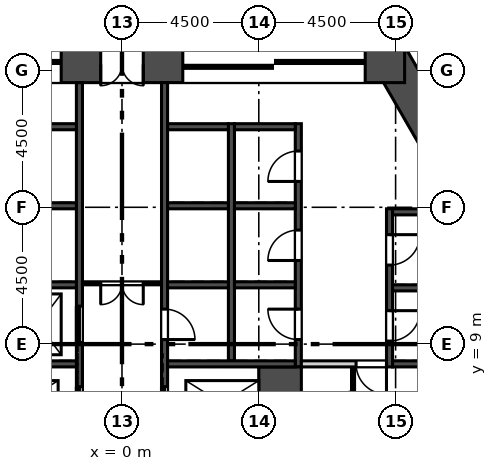
"""IFC4 building model, lengths in metres.
Left out: names, types, materials, properties, quantities, classifications, styles, units other than length and angle.
Written with IfcOpenShell. Run it as: python <this file> out.ifc"""

import sys

from ifc_helpers import new_model, si_unit, direction, frame, frame_2d, origin, place, context, subcontext, project, spatial, rectangle, extrude, element, fill, save


model = new_model("IFC4")
c1 = context("Model", 3, precision=1e-05, world=origin(), true_north=direction((0.0, 1.0)))
c2 = subcontext(c1, "Body", "Model", "MODEL_VIEW")
j1 = project(units=[si_unit("LENGTHUNIT", "METRE"), si_unit("PLANEANGLEUNIT", "RADIAN")], contexts=[c1])
p1 = place(None, origin())
s1 = spatial("IfcSite", under=j1, at=p1, CompositionType="ELEMENT")
p2 = place(p1, origin())
s2 = spatial("IfcBuilding", under=s1, at=p2, CompositionType="ELEMENT")
p3 = place(p2, frame((0.0, 0.0, 132.1)))
s3 = spatial("IfcBuildingStorey", under=s2, at=p3, CompositionType="ELEMENT", Elevation=132.1)
p4 = place(p3, frame((13.281, 10.699, 0.0), z_axis=(0.0, 0.0, 1.0), x_axis=(-0.499998513025, 0.866026262288, 0.0)))
e1 = element("IfcWall", 1, at=p4, inside=s3, PredefinedType="SHEAR", context=c2, shape_type="SweptSolid", body=[
    extrude(rectangle(XDim=9.008, YDim=1.2, at=frame_2d((4.504, 0.0))), origin(), (0.0, 0.0, 1.0), 5.4),
])
p5 = place(p3, frame((9.296, 18.2, 0.0), z_axis=(0.0, 0.0, 1.0), x_axis=(-1.0, 0.0, 0.0)))
e2 = element("IfcWall", 2, at=p5, inside=s3, PredefinedType="SHEAR", context=c2, shape_type="SweptSolid", body=[
    extrude(rectangle(XDim=18.592, YDim=1.2, at=frame_2d((9.296, 0.0))), origin(), (0.0, 0.0, 1.0), 5.4),
])
p6 = place(p5, frame((8.596, 0.0, 0.0)))
e3 = element("IfcOpeningElement", 3, at=p6, cuts=e2, PredefinedType="OPENING", context=c2, shape_type="SweptSolid", body=[
    extrude(rectangle(XDim=1.4, YDim=2.1, at=frame_2d((0.7, 1.05))), frame((0.0, 0.61, 0.0), z_axis=(0.0, -1.0, 0.0), x_axis=(1.0, 0.0, 0.0)), (0.0, 0.0, 1.0), 1.22),
])
p7 = place(p5, frame((11.296, 0.0, 0.0)))
e4 = element("IfcOpeningElement", 4, at=p7, cuts=e2, PredefinedType="OPENING", context=c2, shape_type="SweptSolid", body=[
    extrude(rectangle(XDim=6.0, YDim=2.4, at=frame_2d((3.0, 1.2))), frame((0.0, 0.61, 0.0), z_axis=(0.0, -1.0, 0.0), x_axis=(1.0, 0.0, 0.0)), (0.0, 0.0, 1.0), 1.22),
])
p8 = place(p5, frame((1.296, 0.0, 0.0)))
e5 = element("IfcOpeningElement", 5, at=p8, cuts=e2, PredefinedType="OPENING", context=c2, shape_type="SweptSolid", body=[
    extrude(rectangle(XDim=6.0, YDim=2.4, at=frame_2d((3.0, 1.2))), frame((0.0, 0.61, 0.0), z_axis=(0.0, -1.0, 0.0), x_axis=(1.0, 0.0, 0.0)), (0.0, 0.0, 1.0), 1.22),
])
p9 = place(p3, frame((29.746, 7.709, 0.0), z_axis=(0.0, 0.0, 1.0), x_axis=(-0.500000700546, 0.866024999324, 0.0)))
e6 = element("IfcWall", 6, at=p9, inside=s3, PredefinedType="SOLIDWALL", context=c2, shape_type="SweptSolid", body=[
    extrude(rectangle(XDim=50.787, YDim=0.34, at=frame_2d((25.393, 0.0))), origin(), (0.0, 0.0, 1.0), 5.0),
])
p10 = place(p9, frame((3.197, 0.0, 0.9)))
e7 = element("IfcOpeningElement", 7, at=p10, cuts=e6, PredefinedType="OPENING", context=c2, shape_type="SweptSolid", body=[
    extrude(rectangle(XDim=1.885, YDim=3.0, at=frame_2d((0.942, 1.5))), frame((0.0, 0.18, 0.0), z_axis=(0.0, -1.0, 0.0), x_axis=(1.0, 0.0, 0.0)), (0.0, 0.0, 1.0), 0.36),
])
p11 = place(p9, frame((6.197, 0.0, 0.9)))
e8 = element("IfcOpeningElement", 8, at=p11, cuts=e6, PredefinedType="OPENING", context=c2, shape_type="SweptSolid", body=[
    extrude(rectangle(XDim=1.885, YDim=3.0, at=frame_2d((0.942, 1.5))), frame((0.0, 0.18, 0.0), z_axis=(0.0, -1.0, 0.0), x_axis=(1.0, 0.0, 0.0)), (0.0, 0.0, 1.0), 0.36),
])
p12 = place(p9, frame((9.197, 0.0, 0.9)))
e9 = element("IfcOpeningElement", 9, at=p12, cuts=e6, PredefinedType="OPENING", context=c2, shape_type="SweptSolid", body=[
    extrude(rectangle(XDim=1.885, YDim=3.0, at=frame_2d((0.942, 1.5))), frame((0.0, 0.18, 0.0), z_axis=(0.0, -1.0, 0.0), x_axis=(1.0, 0.0, 0.0)), (0.0, 0.0, 1.0), 0.36),
])
p13 = place(p9, frame((12.197, 0.0, 0.9)))
e10 = element("IfcOpeningElement", 10, at=p13, cuts=e6, PredefinedType="OPENING", context=c2, shape_type="SweptSolid", body=[
    extrude(rectangle(XDim=1.885, YDim=3.0, at=frame_2d((0.942, 1.5))), frame((0.0, 0.18, 0.0), z_axis=(0.0, -1.0, 0.0), x_axis=(1.0, 0.0, 0.0)), (0.0, 0.0, 1.0), 0.36),
])
p14 = place(p9, frame((15.197, 0.0, 0.9)))
e11 = element("IfcOpeningElement", 11, at=p14, cuts=e6, PredefinedType="OPENING", context=c2, shape_type="SweptSolid", body=[
    extrude(rectangle(XDim=1.885, YDim=3.0, at=frame_2d((0.942, 1.5))), frame((0.0, 0.18, 0.0), z_axis=(0.0, -1.0, 0.0), x_axis=(1.0, 0.0, 0.0)), (0.0, 0.0, 1.0), 0.36),
])
p15 = place(p9, frame((18.197, 0.0, 0.9)))
e12 = element("IfcOpeningElement", 12, at=p15, cuts=e6, PredefinedType="OPENING", context=c2, shape_type="SweptSolid", body=[
    extrude(rectangle(XDim=1.885, YDim=3.0, at=frame_2d((0.942, 1.5))), frame((0.0, 0.18, 0.0), z_axis=(0.0, -1.0, 0.0), x_axis=(1.0, 0.0, 0.0)), (0.0, 0.0, 1.0), 0.36),
])
p16 = place(p9, frame((21.197, 0.0, 0.9)))
e13 = element("IfcOpeningElement", 13, at=p16, cuts=e6, PredefinedType="OPENING", context=c2, shape_type="SweptSolid", body=[
    extrude(rectangle(XDim=1.885, YDim=3.0, at=frame_2d((0.942, 1.5))), frame((0.0, 0.18, 0.0), z_axis=(0.0, -1.0, 0.0), x_axis=(1.0, 0.0, 0.0)), (0.0, 0.0, 1.0), 0.36),
])
p17 = place(p9, frame((24.197, 0.0, 0.9)))
e14 = element("IfcOpeningElement", 14, at=p17, cuts=e6, PredefinedType="OPENING", context=c2, shape_type="SweptSolid", body=[
    extrude(rectangle(XDim=1.885, YDim=3.0, at=frame_2d((0.942, 1.5))), frame((0.0, 0.18, 0.0), z_axis=(0.0, -1.0, 0.0), x_axis=(1.0, 0.0, 0.0)), (0.0, 0.0, 1.0), 0.36),
])
p18 = place(p9, frame((27.197, 0.0, 0.9)))
e15 = element("IfcOpeningElement", 15, at=p18, cuts=e6, PredefinedType="OPENING", context=c2, shape_type="SweptSolid", body=[
    extrude(rectangle(XDim=1.885, YDim=3.0, at=frame_2d((0.942, 1.5))), frame((0.0, 0.18, 0.0), z_axis=(0.0, -1.0, 0.0), x_axis=(1.0, 0.0, 0.0)), (0.0, 0.0, 1.0), 0.36),
])
p19 = place(p9, frame((30.197, 0.0, 0.9)))
e16 = element("IfcOpeningElement", 16, at=p19, cuts=e6, PredefinedType="OPENING", context=c2, shape_type="SweptSolid", body=[
    extrude(rectangle(XDim=1.885, YDim=3.0, at=frame_2d((0.942, 1.5))), frame((0.0, 0.18, 0.0), z_axis=(0.0, -1.0, 0.0), x_axis=(1.0, 0.0, 0.0)), (0.0, 0.0, 1.0), 0.36),
])
p20 = place(p9, frame((33.197, 0.0, 0.9)))
e17 = element("IfcOpeningElement", 17, at=p20, cuts=e6, PredefinedType="OPENING", context=c2, shape_type="SweptSolid", body=[
    extrude(rectangle(XDim=1.885, YDim=3.0, at=frame_2d((0.942, 1.5))), frame((0.0, 0.18, 0.0), z_axis=(0.0, -1.0, 0.0), x_axis=(1.0, 0.0, 0.0)), (0.0, 0.0, 1.0), 0.36),
])
p21 = place(p9, frame((36.197, 0.0, 0.9)))
e18 = element("IfcOpeningElement", 18, at=p21, cuts=e6, PredefinedType="OPENING", context=c2, shape_type="SweptSolid", body=[
    extrude(rectangle(XDim=1.885, YDim=3.0, at=frame_2d((0.942, 1.5))), frame((0.0, 0.18, 0.0), z_axis=(0.0, -1.0, 0.0), x_axis=(1.0, 0.0, 0.0)), (0.0, 0.0, 1.0), 0.36),
])
p22 = place(p9, frame((39.197, 0.0, 0.9)))
e19 = element("IfcOpeningElement", 19, at=p22, cuts=e6, PredefinedType="OPENING", context=c2, shape_type="SweptSolid", body=[
    extrude(rectangle(XDim=1.885, YDim=3.0, at=frame_2d((0.942, 1.5))), frame((0.0, 0.18, 0.0), z_axis=(0.0, -1.0, 0.0), x_axis=(1.0, 0.0, 0.0)), (0.0, 0.0, 1.0), 0.36),
])
p23 = place(p9, frame((42.197, 0.0, 0.9)))
e20 = element("IfcOpeningElement", 20, at=p23, cuts=e6, PredefinedType="OPENING", context=c2, shape_type="SweptSolid", body=[
    extrude(rectangle(XDim=1.885, YDim=3.0, at=frame_2d((0.942, 1.5))), frame((0.0, 0.18, 0.0), z_axis=(0.0, -1.0, 0.0), x_axis=(1.0, 0.0, 0.0)), (0.0, 0.0, 1.0), 0.36),
])
p24 = place(p9, frame((45.197, 0.0, 0.9)))
e21 = element("IfcOpeningElement", 21, at=p24, cuts=e6, PredefinedType="OPENING", context=c2, shape_type="SweptSolid", body=[
    extrude(rectangle(XDim=1.885, YDim=3.0, at=frame_2d((0.942, 1.5))), frame((0.0, 0.18, 0.0), z_axis=(0.0, -1.0, 0.0), x_axis=(1.0, 0.0, 0.0)), (0.0, 0.0, 1.0), 0.36),
])
p25 = place(p3, frame((8.8, 8.25, -0.4), z_axis=(0.0, 0.0, 1.0), x_axis=(0.0, 1.0, 0.0)))
e22 = element("IfcWall", 22, at=p25, inside=s3, PredefinedType="SOLIDWALL", context=c2, shape_type="SweptSolid", body=[
    extrude(rectangle(XDim=5.2, YDim=0.2, at=frame_2d((2.6, 0.0))), origin(), (0.0, 0.0, 1.0), 5.4),
])
p26 = place(p25, frame((0.85, 0.0, 0.4)))
e23 = element("IfcOpeningElement", 23, at=p26, cuts=e22, PredefinedType="OPENING", context=c2, shape_type="SweptSolid", body=[
    extrude(rectangle(XDim=1.0, YDim=2.1, at=frame_2d((0.5, 1.05))), frame((0.0, 0.11, 0.0), z_axis=(0.0, -1.0, 0.0), x_axis=(1.0, 0.0, 0.0)), (0.0, 0.0, 1.0), 0.22),
])
p27 = place(p25, frame((3.35, 0.0, 0.4)))
e24 = element("IfcOpeningElement", 24, at=p27, cuts=e22, PredefinedType="OPENING", context=c2, shape_type="SweptSolid", body=[
    extrude(rectangle(XDim=1.0, YDim=2.1, at=frame_2d((0.5, 1.05))), frame((0.0, 0.11, 0.0), z_axis=(0.0, -1.0, 0.0), x_axis=(1.0, 0.0, 0.0)), (0.0, 0.0, 1.0), 0.22),
])
p28 = place(p3, frame((5.8, 8.25, -0.4), z_axis=(0.0, 0.0, 1.0), x_axis=(0.0, 1.0, 0.0)))
e25 = element("IfcWall", 25, at=p28, inside=s3, PredefinedType="SOLIDWALL", context=c2, shape_type="SweptSolid", body=[
    extrude(rectangle(XDim=8.0, YDim=0.2, at=frame_2d((4.0, 0.0))), origin(), (0.0, 0.0, 1.0), 5.4),
])
p29 = place(p28, frame((0.9, 0.0, 0.4)))
e26 = element("IfcOpeningElement", 26, at=p29, cuts=e25, PredefinedType="OPENING", context=c2, shape_type="SweptSolid", body=[
    extrude(rectangle(XDim=1.0, YDim=2.1, at=frame_2d((0.5, 1.05))), frame((0.0, 0.11, 0.0), z_axis=(0.0, -1.0, 0.0), x_axis=(1.0, 0.0, 0.0)), (0.0, 0.0, 1.0), 0.22),
])
p30 = place(p28, frame((3.5, 0.0, 0.4)))
e27 = element("IfcOpeningElement", 27, at=p30, cuts=e25, PredefinedType="OPENING", context=c2, shape_type="SweptSolid", body=[
    extrude(rectangle(XDim=1.0, YDim=2.1, at=frame_2d((0.5, 1.05))), frame((0.0, 0.11, 0.0), z_axis=(0.0, -1.0, 0.0), x_axis=(1.0, 0.0, 0.0)), (0.0, 0.0, 1.0), 0.22),
])
p31 = place(p28, frame((6.1, 0.0, 0.4)))
e28 = element("IfcOpeningElement", 28, at=p31, cuts=e25, PredefinedType="OPENING", context=c2, shape_type="SweptSolid", body=[
    extrude(rectangle(XDim=1.0, YDim=2.1, at=frame_2d((0.5, 1.05))), frame((0.0, 0.11, 0.0), z_axis=(0.0, -1.0, 0.0), x_axis=(1.0, 0.0, 0.0)), (0.0, 0.0, 1.0), 0.22),
])
p32 = place(p3, frame((3.6, 8.45, -0.4), z_axis=(0.0, 0.0, 1.0), x_axis=(0.0, 1.0, 0.0)))
e29 = element("IfcWall", 29, at=p32, inside=s3, PredefinedType="SOLIDWALL", context=c2, shape_type="SweptSolid", body=[
    extrude(rectangle(XDim=7.8, YDim=0.2, at=frame_2d((3.9, 0.0))), origin(), (0.0, 0.0, 1.0), 5.4),
])
p33 = place(p3, frame((-1.4, 5.85, -0.4), z_axis=(0.0, 0.0, 1.0), x_axis=(0.0, 1.0, 0.0)))
e30 = element("IfcWall", 30, at=p33, inside=s3, PredefinedType="SOLIDWALL", context=c2, shape_type="SweptSolid", body=[
    extrude(rectangle(XDim=11.75, YDim=0.2, at=frame_2d((5.875, 0.0))), origin(), (0.0, 0.0, 1.0), 5.4),
])
p34 = place(p33, frame((3.2, 0.0, 0.4)))
e31 = element("IfcOpeningElement", 31, at=p34, cuts=e30, PredefinedType="OPENING", context=c2, shape_type="SweptSolid", body=[
    extrude(rectangle(XDim=1.2, YDim=2.1, at=frame_2d((0.6, 1.05))), frame((0.0, 0.11, 0.0), z_axis=(0.0, -1.0, 0.0), x_axis=(1.0, 0.0, 0.0)), (0.0, 0.0, 1.0), 0.22),
])
p35 = place(p33, frame((0.65, 0.0, 0.4)))
e32 = element("IfcOpeningElement", 32, at=p35, cuts=e30, PredefinedType="OPENING", context=c2, shape_type="SweptSolid", body=[
    extrude(rectangle(XDim=1.1, YDim=2.1, at=frame_2d((0.55, 1.05))), frame((0.0, 0.11, 0.0), z_axis=(0.0, -1.0, 0.0), x_axis=(1.0, 0.0, 0.0)), (0.0, 0.0, 1.0), 0.22),
])
p36 = place(p3, frame((1.4, 5.85, -0.4), z_axis=(0.0, 0.0, 1.0), x_axis=(0.0, 1.0, 0.0)))
e33 = element("IfcWall", 33, at=p36, inside=s3, PredefinedType="SOLIDWALL", context=c2, shape_type="SweptSolid", body=[
    extrude(rectangle(XDim=11.75, YDim=0.2, at=frame_2d((5.875, 0.0))), origin(), (0.0, 0.0, 1.0), 5.4),
])
p37 = place(p36, frame((0.65, 0.0, 0.4)))
e34 = element("IfcOpeningElement", 34, at=p37, cuts=e33, PredefinedType="OPENING", context=c2, shape_type="SweptSolid", body=[
    extrude(rectangle(XDim=1.1, YDim=2.1, at=frame_2d((0.55, 1.05))), frame((0.0, 0.11, 0.0), z_axis=(0.0, -1.0, 0.0), x_axis=(1.0, 0.0, 0.0)), (0.0, 0.0, 1.0), 0.22),
])
p38 = place(p36, frame((3.3, 0.0, 0.4)))
e35 = element("IfcOpeningElement", 35, at=p38, cuts=e33, PredefinedType="OPENING", context=c2, shape_type="SweptSolid", body=[
    extrude(rectangle(XDim=1.0, YDim=2.1, at=frame_2d((0.5, 1.05))), frame((0.0, 0.11, 0.0), z_axis=(0.0, -1.0, 0.0), x_axis=(1.0, 0.0, 0.0)), (0.0, 0.0, 1.0), 0.22),
])
p39 = place(p3, frame((5.2, 5.85, -0.4), z_axis=(0.0, 0.0, 1.0), x_axis=(0.0, 1.0, 0.0)))
e36 = element("IfcWall", 36, at=p39, inside=s3, PredefinedType="SOLIDWALL", context=c2, shape_type="SweptSolid", body=[
    extrude(rectangle(XDim=2.4, YDim=1.4, at=frame_2d((1.2, 0.0))), origin(), (0.0, 0.0, 1.0), 5.4),
])
p40 = place(p3, frame((8.9, 8.35, -0.4), z_axis=(0.0, 0.0, 1.0), x_axis=(1.0, 0.0, 0.0)))
e37 = element("IfcWall", 37, at=p40, inside=s3, PredefinedType="SOLIDWALL", context=c2, shape_type="SweptSolid", body=[
    extrude(rectangle(XDim=2.0, YDim=0.2, at=frame_2d((1.0, 0.0))), origin(), (0.0, 0.0, 1.0), 5.4),
])
for number, where, z_axis, x_axis in (
    (38, (-5.7, 8.35, -0.4), (0.0, 0.0, 1.0), (1.0, 0.0, 0.0)),
    (39, (1.5, 8.35, -0.4), (0.0, 0.0, 1.0), (1.0, 0.0, 0.0)),
):
    element("IfcWall", number, at=place(p3, frame(where, z_axis=z_axis, x_axis=x_axis)), inside=s3, PredefinedType="SOLIDWALL", context=c2, shape_type="SweptSolid", body=[
        extrude(rectangle(XDim=4.2, YDim=0.2, at=frame_2d((2.1, 0.0))), origin(), (0.0, 0.0, 1.0), 5.4),
    ])
for number, where, z_axis, x_axis in (
    (40, (-3.5, 10.95, -0.4), (0.0, 0.0, 1.0), (1.0, 0.0, 0.0)),
    (41, (-3.5, 13.55, -0.4), (0.0, 0.0, 1.0), (1.0, 0.0, 0.0)),
    (42, (-3.5, 16.15, -0.4), (0.0, 0.0, 1.0), (1.0, 0.0, 0.0)),
    (43, (8.9, 10.85, -0.4), (0.0, 0.0, 1.0), (1.0, 0.0, 0.0)),
    (44, (8.9, 13.35, -0.4), (0.0, 0.0, 1.0), (1.0, 0.0, 0.0)),
    (45, (3.7, 10.95, -0.4), (0.0, 0.0, 1.0), (1.0, 0.0, 0.0)),
    (46, (3.7, 13.55, -0.4), (0.0, 0.0, 1.0), (1.0, 0.0, 0.0)),
    (47, (3.7, 16.15, -0.4), (0.0, 0.0, 1.0), (1.0, 0.0, 0.0)),
    (48, (1.5, 10.95, -0.4), (0.0, 0.0, 1.0), (1.0, 0.0, 0.0)),
    (49, (1.5, 13.55, -0.4), (0.0, 0.0, 1.0), (1.0, 0.0, 0.0)),
    (50, (1.5, 16.15, -0.4), (0.0, 0.0, 1.0), (1.0, 0.0, 0.0)),
):
    element("IfcWall", number, at=place(p3, frame(where, z_axis=z_axis, x_axis=x_axis)), inside=s3, PredefinedType="SOLIDWALL", context=c2, shape_type="SweptSolid", body=[
        extrude(rectangle(XDim=2.0, YDim=0.2, at=frame_2d((1.0, 0.0))), origin(), (0.0, 0.0, 1.0), 5.4),
    ])
p41 = place(p3, frame((7.6, 5.85, 0.0), z_axis=(0.0, 0.0, 1.0), x_axis=(0.0, 1.0, 0.0)))
e51 = element("IfcWall", 51, at=p41, inside=s3, PredefinedType="PARTITIONING", context=c2, shape_type="SweptSolid", body=[
    extrude(rectangle(XDim=2.4, YDim=0.1, at=frame_2d((1.2, 0.0))), origin(), (0.0, 0.0, 1.0), 5.0),
])
p42 = place(p41, frame((0.7, 0.0, 0.0)))
e52 = element("IfcOpeningElement", 52, at=p42, cuts=e51, PredefinedType="OPENING", context=c2, shape_type="SweptSolid", body=[
    extrude(rectangle(XDim=0.9, YDim=2.1, at=frame_2d((0.45, 1.05))), frame((0.0, 0.06, 0.0), z_axis=(0.0, -1.0, 0.0), x_axis=(1.0, 0.0, 0.0)), (0.0, 0.0, 1.0), 0.12),
])
p43 = place(p3, frame((5.9, 8.35, 0.0), z_axis=(0.0, 0.0, 1.0), x_axis=(1.0, 0.0, 0.0)))
e53 = element("IfcWall", 53, at=p43, inside=s3, PredefinedType="SOLIDWALL", context=c2, shape_type="SweptSolid", body=[
    extrude(rectangle(XDim=2.8, YDim=0.2, at=frame_2d((1.4, 0.0))), origin(), (0.0, 0.0, 1.0), 5.0),
])
p44 = place(p43, frame((1.8, 0.0, 0.0)))
e54 = element("IfcOpeningElement", 54, at=p44, cuts=e53, PredefinedType="OPENING", context=c2, shape_type="SweptSolid", body=[
    extrude(rectangle(XDim=1.0, YDim=2.1, at=frame_2d((0.5, 1.05))), frame((0.0, 0.11, 0.0), z_axis=(0.0, -1.0, 0.0), x_axis=(1.0, 0.0, 0.0)), (0.0, 0.0, 1.0), 0.22),
])
p45 = place(p3, frame((-1.3, 11.0, 0.0), z_axis=(0.0, 0.0, 1.0), x_axis=(1.0, 0.0, 0.0)))
e55 = element("IfcWall", 55, at=p45, inside=s3, PredefinedType="PARTITIONING", context=c2, shape_type="SweptSolid", body=[
    extrude(rectangle(XDim=2.6, YDim=0.1, at=frame_2d((1.3, 0.0))), origin(), (0.0, 0.0, 1.0), 5.0),
])
p46 = place(p45, frame((0.6, 0.0, 0.0)))
e56 = element("IfcOpeningElement", 56, at=p46, cuts=e55, PredefinedType="OPENING", context=c2, shape_type="SweptSolid", body=[
    extrude(rectangle(XDim=1.4, YDim=2.1, at=frame_2d((0.7, 1.05))), frame((0.0, 0.06, 0.0), z_axis=(0.0, -1.0, 0.0), x_axis=(1.0, 0.0, 0.0)), (0.0, 0.0, 1.0), 0.12),
])
p47 = place(p34, origin())
e57 = element("IfcDoor", 57, at=p47, inside=s3, OperationType="SLIDING_TO_LEFT", PredefinedType="DOOR", context=c2, shape_type="SweptSolid", body=[
    extrude(rectangle(XDim=1.2, YDim=2.1, at=frame_2d((0.6, 1.05))), frame((0.0, 0.025, 0.0), z_axis=(0.0, -1.0, 0.0), x_axis=(1.0, 0.0, 0.0)), (0.0, 0.0, 1.0), 0.05),
])
fill(e31, e57)
p48 = place(p35, origin())
e58 = element("IfcDoor", 58, at=p48, inside=s3, OperationType="SLIDING_TO_RIGHT", PredefinedType="DOOR", context=c2, shape_type="SweptSolid", body=[
    extrude(rectangle(XDim=1.1, YDim=2.1, at=frame_2d((0.55, 1.05))), frame((0.0, 0.025, 0.0), z_axis=(0.0, -1.0, 0.0), x_axis=(1.0, 0.0, 0.0)), (0.0, 0.0, 1.0), 0.05),
])
fill(e32, e58)
p49 = place(p37, origin())
e59 = element("IfcDoor", 59, at=p49, inside=s3, OperationType="SLIDING_TO_RIGHT", PredefinedType="DOOR", context=c2, shape_type="SweptSolid", body=[
    extrude(rectangle(XDim=1.1, YDim=2.1, at=frame_2d((0.55, 1.05))), frame((0.0, 0.025, 0.0), z_axis=(0.0, -1.0, 0.0), x_axis=(1.0, 0.0, 0.0)), (0.0, 0.0, 1.0), 0.05),
])
fill(e34, e59)
p50 = place(p26, frame((1.0, 0.0, 0.0), z_axis=(0.0, 0.0, 1.0), x_axis=(-1.0, 0.0, 0.0)))
e60 = element("IfcDoor", 60, at=p50, inside=s3, OperationType="SINGLE_SWING_LEFT", PredefinedType="DOOR", context=c2, shape_type="SweptSolid", body=[
    extrude(rectangle(XDim=1.0, YDim=2.1, at=frame_2d((0.5, 1.05))), frame((0.0, 0.025, 0.0), z_axis=(0.0, -1.0, 0.0), x_axis=(1.0, 0.0, 0.0)), (0.0, 0.0, 1.0), 0.05),
])
fill(e23, e60)
p51 = place(p27, frame((1.0, 0.0, 0.0), z_axis=(0.0, 0.0, 1.0), x_axis=(-1.0, 0.0, 0.0)))
e61 = element("IfcDoor", 61, at=p51, inside=s3, OperationType="SINGLE_SWING_LEFT", PredefinedType="DOOR", context=c2, shape_type="SweptSolid", body=[
    extrude(rectangle(XDim=1.0, YDim=2.1, at=frame_2d((0.5, 1.05))), frame((0.0, 0.025, 0.0), z_axis=(0.0, -1.0, 0.0), x_axis=(1.0, 0.0, 0.0)), (0.0, 0.0, 1.0), 0.05),
])
fill(e24, e61)
p52 = place(p29, origin())
e62 = element("IfcDoor", 62, at=p52, inside=s3, OperationType="SINGLE_SWING_RIGHT", PredefinedType="DOOR", context=c2, shape_type="SweptSolid", body=[
    extrude(rectangle(XDim=1.0, YDim=2.1, at=frame_2d((0.5, 1.05))), frame((0.0, 0.025, 0.0), z_axis=(0.0, -1.0, 0.0), x_axis=(1.0, 0.0, 0.0)), (0.0, 0.0, 1.0), 0.05),
])
fill(e26, e62)
p53 = place(p30, origin())
e63 = element("IfcDoor", 63, at=p53, inside=s3, OperationType="SINGLE_SWING_LEFT", PredefinedType="DOOR", context=c2, shape_type="SweptSolid", body=[
    extrude(rectangle(XDim=1.0, YDim=2.1, at=frame_2d((0.5, 1.05))), frame((0.0, 0.025, 0.0), z_axis=(0.0, -1.0, 0.0), x_axis=(1.0, 0.0, 0.0)), (0.0, 0.0, 1.0), 0.05),
])
fill(e27, e63)
p54 = place(p31, origin())
e64 = element("IfcDoor", 64, at=p54, inside=s3, OperationType="SINGLE_SWING_LEFT", PredefinedType="DOOR", context=c2, shape_type="SweptSolid", body=[
    extrude(rectangle(XDim=1.0, YDim=2.1, at=frame_2d((0.5, 1.05))), frame((0.0, 0.025, 0.0), z_axis=(0.0, -1.0, 0.0), x_axis=(1.0, 0.0, 0.0)), (0.0, 0.0, 1.0), 0.05),
])
fill(e28, e64)
p55 = place(p38, frame((1.0, 0.0, 0.0), z_axis=(0.0, 0.0, 1.0), x_axis=(-1.0, 0.0, 0.0)))
e65 = element("IfcDoor", 65, at=p55, inside=s3, OperationType="SINGLE_SWING_RIGHT", PredefinedType="DOOR", context=c2, shape_type="SweptSolid", body=[
    extrude(rectangle(XDim=1.0, YDim=2.1, at=frame_2d((0.5, 1.05))), frame((0.0, 0.025, 0.0), z_axis=(0.0, -1.0, 0.0), x_axis=(1.0, 0.0, 0.0)), (0.0, 0.0, 1.0), 0.05),
])
fill(e35, e65)
p56 = place(p44, frame((1.0, 0.0, 0.0), z_axis=(0.0, 0.0, 1.0), x_axis=(-1.0, 0.0, 0.0)))
e66 = element("IfcDoor", 66, at=p56, inside=s3, OperationType="SINGLE_SWING_LEFT", PredefinedType="DOOR", context=c2, shape_type="SweptSolid", body=[
    extrude(rectangle(XDim=1.0, YDim=2.1, at=frame_2d((0.5, 1.05))), frame((0.0, 0.025, 0.0), z_axis=(0.0, -1.0, 0.0), x_axis=(1.0, 0.0, 0.0)), (0.0, 0.0, 1.0), 0.05),
])
fill(e54, e66)
p57 = place(p46, frame((1.4, 0.0, 0.0), z_axis=(0.0, 0.0, 1.0), x_axis=(-1.0, 0.0, 0.0)))
e67 = element("IfcDoor", 67, at=p57, inside=s3, OperationType="DOUBLE_DOOR_SINGLE_SWING", PredefinedType="DOOR", context=c2, shape_type="SweptSolid", body=[
    extrude(rectangle(XDim=1.4, YDim=2.1, at=frame_2d((0.7, 1.05))), frame((0.0, 0.025, 0.0), z_axis=(0.0, -1.0, 0.0), x_axis=(1.0, 0.0, 0.0)), (0.0, 0.0, 1.0), 0.05),
])
fill(e56, e67)
p58 = place(p6, origin())
e68 = element("IfcDoor", 68, at=p58, inside=s3, OperationType="DOUBLE_DOOR_SINGLE_SWING", PredefinedType="DOOR", context=c2, shape_type="SweptSolid", body=[
    extrude(rectangle(XDim=1.4, YDim=2.1, at=frame_2d((0.7, 1.05))), frame((0.0, 0.025, 0.0), z_axis=(0.0, -1.0, 0.0), x_axis=(1.0, 0.0, 0.0)), (0.0, 0.0, 1.0), 0.05),
])
fill(e3, e68)
p59 = place(p7, origin())
e69 = element("IfcDoor", 69, at=p59, inside=s3, OperationType="DOUBLE_DOOR_SLIDING", PredefinedType="DOOR", context=c2, shape_type="SweptSolid", body=[
    extrude(rectangle(XDim=6.0, YDim=2.4, at=frame_2d((3.0, 1.2))), frame((0.0, 0.025, 0.0), z_axis=(0.0, -1.0, 0.0), x_axis=(1.0, 0.0, 0.0)), (0.0, 0.0, 1.0), 0.05),
])
fill(e4, e69)
p60 = place(p8, origin())
e70 = element("IfcDoor", 70, at=p60, inside=s3, OperationType="DOUBLE_DOOR_SLIDING", PredefinedType="DOOR", context=c2, shape_type="SweptSolid", body=[
    extrude(rectangle(XDim=6.0, YDim=2.4, at=frame_2d((3.0, 1.2))), frame((0.0, 0.025, 0.0), z_axis=(0.0, -1.0, 0.0), x_axis=(1.0, 0.0, 0.0)), (0.0, 0.0, 1.0), 0.05),
])
fill(e5, e70)
save(model, sys.argv[1])
